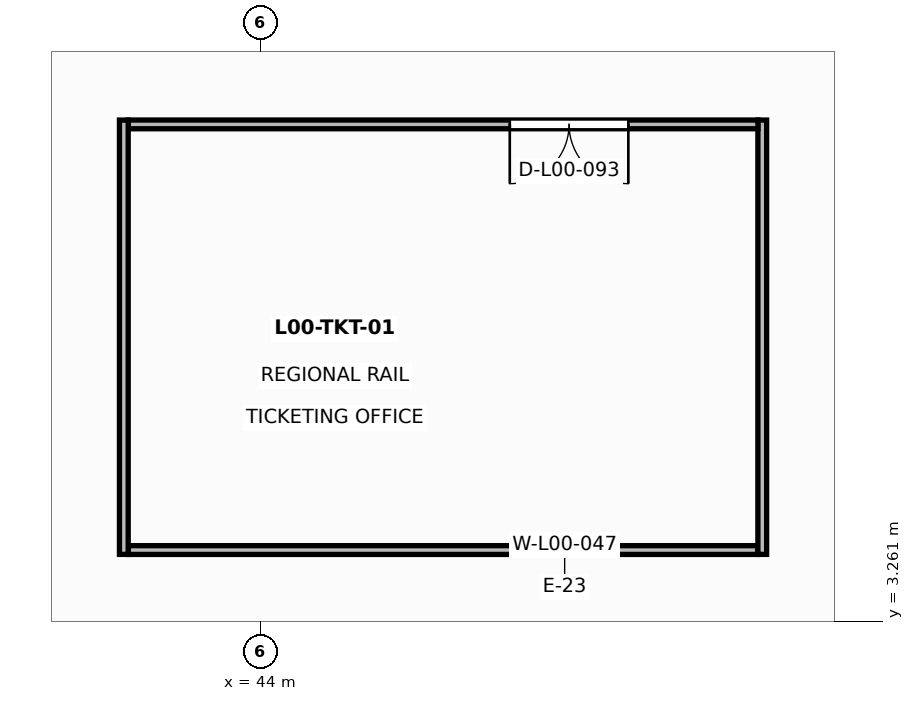
"""IFC4 building model, lengths in metres.
Left out: names, types, materials, properties, quantities, classifications, styles, units other than length and angle.
Written with IfcOpenShell. Run it as: python <this file> out.ifc"""

import sys

from ifc_helpers import new_model, si_unit, direction, frame, frame_2d, origin, place, context, subcontext, project, spatial, rectangle, extrude, element, fill, save


model = new_model("IFC4")
c1 = context("Model", 3, precision=1e-05, world=origin(), true_north=direction((0.0, 1.0)))
c2 = subcontext(c1, "Body", "Model", "MODEL_VIEW")
j1 = project(units=[si_unit("LENGTHUNIT", "METRE"), si_unit("PLANEANGLEUNIT", "RADIAN")], contexts=[c1])
p1 = place(None, origin())
s1 = spatial("IfcSite", under=j1, at=p1, CompositionType="ELEMENT")
p2 = place(p1, origin())
s2 = spatial("IfcBuilding", under=s1, at=p2, CompositionType="ELEMENT")
p3 = place(p2, origin())
s3 = spatial("IfcBuildingStorey", under=s2, at=p3, CompositionType="ELEMENT", Elevation=0.0)
p4 = place(p3, frame((42.258, 4.2, 0.0), z_axis=(0.0, 0.0, 1.0), x_axis=(1.0, 0.0, 0.0)))
e1 = element("IfcWall", 1, at=p4, inside=s3, PredefinedType="PARTITIONING", context=c2, shape_type="SweptSolid", body=[
    extrude(rectangle(XDim=8.285, YDim=0.115, at=frame_2d((4.143, 0.0))), origin(), (0.0, 0.0, 1.0), 5.73),
])
p5 = place(p3, frame((50.6, 4.143, 0.0), z_axis=(0.0, 0.0, 1.0), x_axis=(0.0, 1.0, 0.0)))
e2 = element("IfcWall", 2, at=p5, inside=s3, PredefinedType="PARTITIONING", context=c2, shape_type="SweptSolid", body=[
    extrude(rectangle(XDim=5.714, YDim=0.115, at=frame_2d((2.857, 0.0))), origin(), (0.0, 0.0, 1.0), 5.73),
])
p6 = place(p3, frame((50.543, 9.8, 0.0), z_axis=(0.0, 0.0, 1.0), x_axis=(-1.0, 0.0, 0.0)))
e3 = element("IfcWall", 3, at=p6, inside=s3, PredefinedType="PARTITIONING", context=c2, shape_type="SweptSolid", body=[
    extrude(rectangle(XDim=8.285, YDim=0.115, at=frame_2d((4.143, 0.0))), origin(), (0.0, 0.0, 1.0), 5.73),
])
p7 = place(p6, frame((1.705, 0.0, 0.0)))
e4 = element("IfcOpeningElement", 4, at=p7, cuts=e3, PredefinedType="OPENING", context=c2, shape_type="SweptSolid", body=[
    extrude(rectangle(XDim=1.56, YDim=2.22, at=frame_2d((0.78, 1.11))), frame((0.0, 0.067, 0.0), z_axis=(0.0, -1.0, 0.0), x_axis=(1.0, 0.0, 0.0)), (0.0, 0.0, 1.0), 0.135),
])
p8 = place(p3, frame((42.2, 9.857, 0.0), z_axis=(0.0, 0.0, 1.0), x_axis=(0.0, -1.0, 0.0)))
e5 = element("IfcWall", 5, at=p8, inside=s3, PredefinedType="PARTITIONING", context=c2, shape_type="SweptSolid", body=[
    extrude(rectangle(XDim=5.714, YDim=0.115, at=frame_2d((2.857, 0.0))), origin(), (0.0, 0.0, 1.0), 5.73),
])
p9 = place(p7, origin())
e6 = element("IfcDoor", 6, at=p9, inside=s3, OperationType="DOUBLE_DOOR_SINGLE_SWING", PredefinedType="DOOR", context=c2, shape_type="SweptSolid", body=[
    extrude(rectangle(XDim=1.56, YDim=2.22, at=frame_2d((0.78, 1.11))), frame((0.0, 0.025, 0.0), z_axis=(0.0, -1.0, 0.0), x_axis=(1.0, 0.0, 0.0)), (0.0, 0.0, 1.0), 0.05),
])
fill(e4, e6)
save(model, sys.argv[1])
